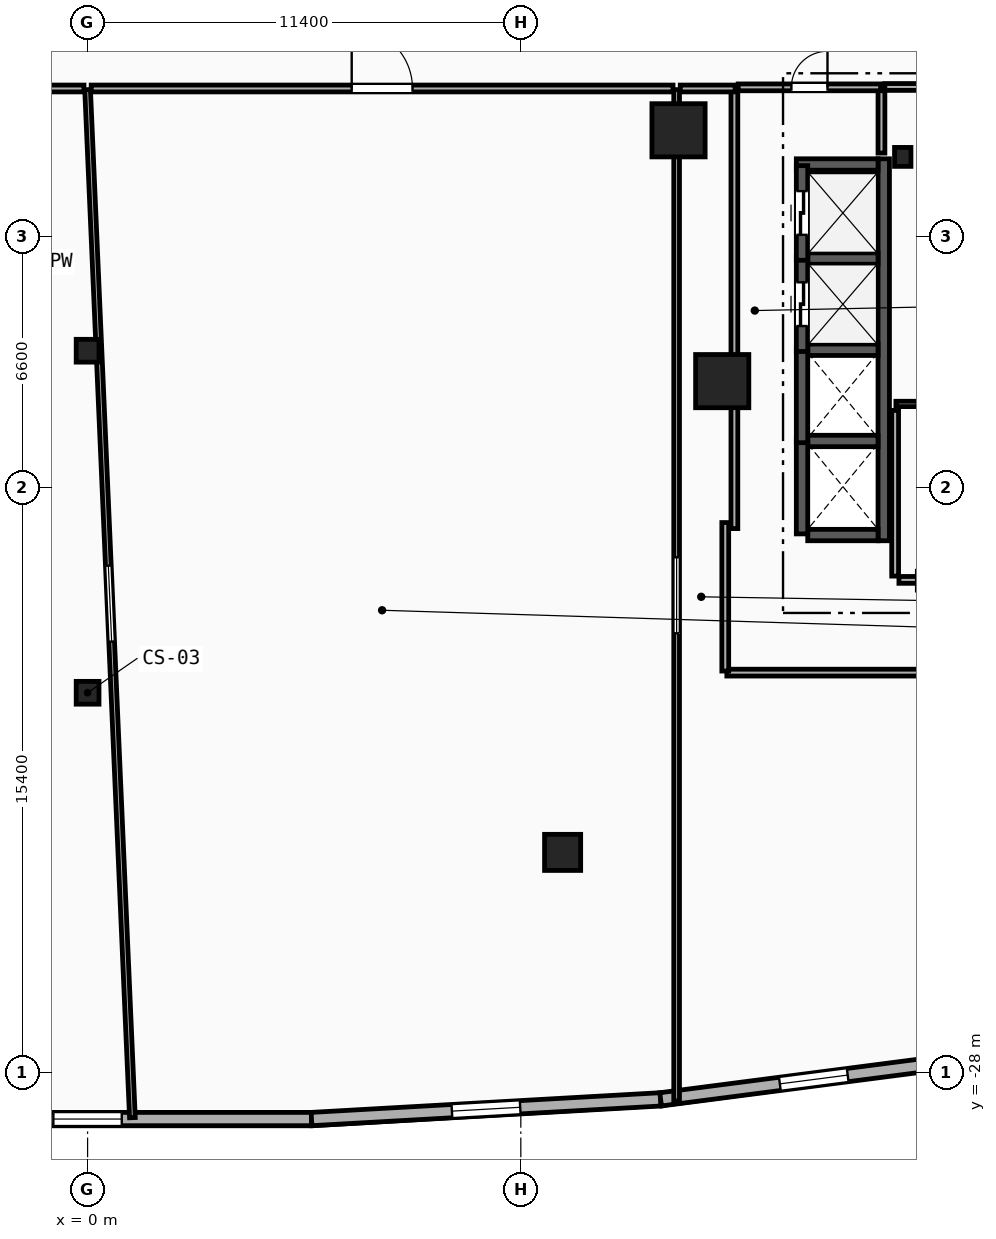
"""IFC4 building model, lengths in metres.
Left out: names, types, materials, properties, quantities, classifications, styles, units other than length and angle.
Written with IfcOpenShell. Run it as: python <this file> out.ifc"""

import sys

from ifc_helpers import new_model, si_unit, direction, frame, frame_2d, origin, origin_2d, place, context, subcontext, project, spatial, rectangle, hollow_rectangle, circle, i_section, extrude, element, fill, save


model = new_model("IFC4")
c1 = context("Model", 3, precision=1e-05, world=origin(), true_north=direction((0.0, 1.0)))
c2 = subcontext(c1, "Body", "Model", "MODEL_VIEW")
j1 = project(units=[si_unit("LENGTHUNIT", "METRE"), si_unit("PLANEANGLEUNIT", "RADIAN")], contexts=[c1])
p1 = place(None, origin())
s1 = spatial("IfcSite", under=j1, at=p1, CompositionType="ELEMENT")
p2 = place(p1, origin())
s2 = spatial("IfcBuilding", under=s1, at=p2, CompositionType="ELEMENT")
p3 = place(p2, frame((0.0, 0.0, 16.0)))
s3 = spatial("IfcBuildingStorey", under=s2, at=p3, CompositionType="ELEMENT", Elevation=16.0)
p4 = place(p3, frame((21.45, -3.9, 0.0), z_axis=(0.0, 0.0, 1.0), x_axis=(1.0, 0.0, 0.0)))
e1 = element("IfcColumn", 1, at=p4, inside=s3, PredefinedType="COLUMN", context=c2, shape_type="SweptSolid", body=[
    extrude(i_section(OverallWidth=0.432, OverallDepth=0.498, WebThickness=0.056, FlangeThickness=0.089, FilletRadius=0.018, at=origin_2d()), origin(), (0.0, 0.0, 1.0), 4.0),
])
for number, where, z_axis, x_axis in (
    (2, (15.55, -3.2, 0.0), (0.0, 0.0, 1.0), (1.0, 0.0, 0.0)),
    (3, (16.7, -9.8, 0.0), (0.0, 0.0, 1.0), (1.0, 0.0, 0.0)),
):
    element("IfcColumn", number, at=place(p3, frame(where, z_axis=z_axis, x_axis=x_axis)), inside=s3, PredefinedType="COLUMN", context=c2, shape_type="SweptSolid", body=[
        extrude(rectangle(XDim=1.4, YDim=1.4, at=origin_2d()), origin(), (0.0, 0.0, 1.0), 4.0),
    ])
for number, where, z_axis, x_axis in (
    (4, (0.0, -18.0, 0.0), (0.0, 0.0, 1.0), (1.0, 0.0, 0.0)),
    (5, (0.0, -9.0, 0.0), (0.0, 0.0, 1.0), (1.0, 0.0, 0.0)),
):
    element("IfcColumn", number, at=place(p3, frame(where, z_axis=z_axis, x_axis=x_axis)), inside=s3, PredefinedType="COLUMN", context=c2, shape_type="SweptSolid", body=[
        extrude(hollow_rectangle(XDim=0.6, YDim=0.6, WallThickness=0.032, at=origin_2d()), origin(), (0.0, 0.0, 1.0), 4.0),
    ])
p5 = place(p3, frame((12.5, -22.2, 0.0), z_axis=(0.0, 0.0, 1.0), x_axis=(1.0, 0.0, 0.0)))
e6 = element("IfcColumn", 6, at=p5, inside=s3, PredefinedType="PILASTER", context=c2, shape_type="SweptSolid", body=[
    extrude(circle(Radius=0.475, at=origin_2d()), origin(), (0.0, 0.0, 1.0), 4.0),
])
p6 = place(p3, frame((-5.893, -29.216, 0.0), z_axis=(0.0, 0.0, 1.0), x_axis=(1.0, 0.0, 0.0)))
e7 = element("IfcWall", 7, at=p6, inside=s3, PredefinedType="SOLIDWALL", context=c2, shape_type="SweptSolid", body=[
    extrude(rectangle(XDim=11.785, YDim=0.35, at=frame_2d((5.893, 0.0))), origin(), (0.0, 0.0, 1.0), 3.65),
])
p7 = place(p6, frame((4.992, 0.0, 0.85)))
e8 = element("IfcOpeningElement", 8, at=p7, cuts=e7, PredefinedType="OPENING", context=c2, shape_type="SweptSolid", body=[
    extrude(rectangle(XDim=1.8, YDim=2.4, at=frame_2d((0.9, 1.2))), frame((0.0, 0.185, 0.0), z_axis=(0.0, -1.0, 0.0), x_axis=(1.0, 0.0, 0.0)), (0.0, 0.0, 1.0), 0.37),
])
p8 = place(p3, frame((5.893, -29.216, 0.0), z_axis=(0.0, 0.0, 1.0), x_axis=(0.998413463137, 0.056307695976, 0.0)))
e9 = element("IfcWall", 9, at=p8, inside=s3, PredefinedType="SOLIDWALL", context=c2, shape_type="SweptSolid", body=[
    extrude(rectangle(XDim=9.201, YDim=0.35, at=frame_2d((4.6, 0.0))), origin(), (0.0, 0.0, 1.0), 3.65),
])
p9 = place(p8, frame((3.7, 0.0, 0.85)))
e10 = element("IfcOpeningElement", 10, at=p9, cuts=e9, PredefinedType="OPENING", context=c2, shape_type="SweptSolid", body=[
    extrude(rectangle(XDim=1.8, YDim=2.4, at=frame_2d((0.9, 1.2))), frame((0.0, 0.185, 0.0), z_axis=(0.0, -1.0, 0.0), x_axis=(1.0, 0.0, 0.0)), (0.0, 0.0, 1.0), 0.37),
])
p10 = place(p3, frame((15.079, -28.698, 0.0), z_axis=(0.0, 0.0, 1.0), x_axis=(0.991688106477, 0.128665067026, 0.0)))
e11 = element("IfcWall", 11, at=p10, inside=s3, PredefinedType="SOLIDWALL", context=c2, shape_type="SweptSolid", body=[
    extrude(rectangle(XDim=8.129, YDim=0.35, at=frame_2d((4.064, 0.0))), origin(), (0.0, 0.0, 1.0), 3.65),
])
p11 = place(p10, frame((3.164, 0.0, 0.85)))
e12 = element("IfcOpeningElement", 12, at=p11, cuts=e11, PredefinedType="OPENING", context=c2, shape_type="SweptSolid", body=[
    extrude(rectangle(XDim=1.8, YDim=2.4, at=frame_2d((0.9, 1.2))), frame((0.0, 0.185, 0.0), z_axis=(0.0, -1.0, 0.0), x_axis=(1.0, 0.0, 0.0)), (0.0, 0.0, 1.0), 0.37),
])
p12 = place(p3, frame((20.89, -3.8, 0.0), z_axis=(0.0, 0.0, 1.0), x_axis=(0.0, 1.0, 0.0)))
e13 = element("IfcWall", 13, at=p12, inside=s3, PredefinedType="PARTITIONING", context=c2, shape_type="SweptSolid", body=[
    extrude(rectangle(XDim=1.65, YDim=0.18, at=frame_2d((0.825, 0.0))), origin(), (0.0, 0.0, 1.0), 3.65),
])
p13 = place(p3, frame((20.98, -2.06, 0.0), z_axis=(0.0, 0.0, 1.0), x_axis=(1.0, 0.0, 0.0)))
e14 = element("IfcWall", 14, at=p13, inside=s3, PredefinedType="PARTITIONING", context=c2, shape_type="SweptSolid", body=[
    extrude(rectangle(XDim=3.0, YDim=0.18, at=frame_2d((1.5, 0.0))), origin(), (0.0, 0.0, 1.0), 3.65),
])
p14 = place(p13, frame((0.9, 0.0, 0.0)))
e15 = element("IfcOpeningElement", 15, at=p14, cuts=e14, PredefinedType="OPENING", context=c2, shape_type="SweptSolid", body=[
    extrude(rectangle(XDim=1.2, YDim=2.15, at=frame_2d((0.6, 1.075))), frame((0.0, 0.1, 0.0), z_axis=(0.0, -1.0, 0.0), x_axis=(1.0, 0.0, 0.0)), (0.0, 0.0, 1.0), 0.2),
])
p15 = place(p3, frame((20.95, -14.0, 0.0), z_axis=(0.0, 0.0, 1.0), x_axis=(0.0, 1.0, 0.0)))
e16 = element("IfcWall", 16, at=p15, inside=s3, PredefinedType="SHEAR", context=c2, shape_type="SweptSolid", body=[
    extrude(rectangle(XDim=10.05, YDim=0.3, at=frame_2d((5.025, 0.0))), origin(), (0.0, 0.0, 1.0), 3.65),
])
p16 = place(p3, frame((18.95, -13.85, 0.0), z_axis=(0.0, 0.0, 1.0), x_axis=(1.0, 0.0, 0.0)))
e17 = element("IfcWall", 17, at=p16, inside=s3, PredefinedType="SHEAR", context=c2, shape_type="SweptSolid", body=[
    extrude(rectangle(XDim=1.85, YDim=0.3, at=frame_2d((0.925, 0.0))), origin(), (0.0, 0.0, 1.0), 3.65),
])
p17 = place(p3, frame((18.65, -4.1, 0.0), z_axis=(0.0, 0.0, 1.0), x_axis=(1.0, 0.0, 0.0)))
e18 = element("IfcWall", 18, at=p17, inside=s3, PredefinedType="SHEAR", context=c2, shape_type="SweptSolid", body=[
    extrude(rectangle(XDim=2.15, YDim=0.3, at=frame_2d((1.075, 0.0))), origin(), (0.0, 0.0, 1.0), 3.65),
])
for number, where, z_axis, x_axis in (
    (19, (18.95, -11.375, 0.0), (0.0, 0.0, 1.0), (1.0, 0.0, 0.0)),
    (20, (18.95, -8.975, 0.0), (0.0, 0.0, 1.0), (1.0, 0.0, 0.0)),
    (21, (18.95, -6.575, 0.0), (0.0, 0.0, 1.0), (1.0, 0.0, 0.0)),
):
    element("IfcWall", number, at=place(p3, frame(where, z_axis=z_axis, x_axis=x_axis)), inside=s3, PredefinedType="SHEAR", context=c2, shape_type="SweptSolid", body=[
        extrude(rectangle(XDim=1.85, YDim=0.3, at=frame_2d((0.925, 0.0))), origin(), (0.0, 0.0, 1.0), 3.65),
    ])
for number, where, z_axis, x_axis in (
    (22, (18.8, -13.82, 0.0), (0.0, 0.0, 1.0), (0.0, 1.0, 0.0)),
    (23, (18.8, -11.42, 0.0), (0.0, 0.0, 1.0), (0.0, 1.0, 0.0)),
):
    element("IfcWall", number, at=place(p3, frame(where, z_axis=z_axis, x_axis=x_axis)), inside=s3, PredefinedType="SHEAR", context=c2, shape_type="SweptSolid", body=[
        extrude(rectangle(XDim=2.49, YDim=0.3, at=frame_2d((1.245, 0.0))), origin(), (0.0, 0.0, 1.0), 3.65),
    ])
p18 = place(p3, frame((18.8, -9.02, 0.0), z_axis=(0.0, 0.0, 1.0), x_axis=(0.0, 1.0, 0.0)))
e24 = element("IfcWall", 24, at=p18, inside=s3, PredefinedType="SHEAR", context=c2, shape_type="SweptSolid", body=[
    extrude(rectangle(XDim=2.49, YDim=0.3, at=frame_2d((1.245, 0.0))), origin(), (0.0, 0.0, 1.0), 3.65),
])
p19 = place(p18, frame((0.67, 0.0, 0.0)))
e25 = element("IfcOpeningElement", 25, at=p19, cuts=e24, PredefinedType="OPENING", context=c2, shape_type="SweptSolid", body=[
    extrude(rectangle(XDim=1.15, YDim=2.2, at=frame_2d((0.575, 1.1))), frame((0.0, 0.16, 0.0), z_axis=(0.0, -1.0, 0.0), x_axis=(1.0, 0.0, 0.0)), (0.0, 0.0, 1.0), 0.32),
])
p20 = place(p3, frame((18.8, -6.62, 0.0), z_axis=(0.0, 0.0, 1.0), x_axis=(0.0, 1.0, 0.0)))
e26 = element("IfcWall", 26, at=p20, inside=s3, PredefinedType="SHEAR", context=c2, shape_type="SweptSolid", body=[
    extrude(rectangle(XDim=2.49, YDim=0.3, at=frame_2d((1.245, 0.0))), origin(), (0.0, 0.0, 1.0), 3.65),
])
p21 = place(p20, frame((0.67, 0.0, 0.0)))
e27 = element("IfcOpeningElement", 27, at=p21, cuts=e26, PredefinedType="OPENING", context=c2, shape_type="SweptSolid", body=[
    extrude(rectangle(XDim=1.15, YDim=2.2, at=frame_2d((0.575, 1.1))), frame((0.0, 0.16, 0.0), z_axis=(0.0, -1.0, 0.0), x_axis=(1.0, 0.0, 0.0)), (0.0, 0.0, 1.0), 0.32),
])
p22 = place(p3, frame((17.02, -13.68, 0.0), z_axis=(0.0, 0.0, 1.0), x_axis=(0.0, 1.0, 0.0)))
e28 = element("IfcWall", 28, at=p22, inside=s3, PredefinedType="PARTITIONING", context=c2, shape_type="SweptSolid", body=[
    extrude(rectangle(XDim=11.51, YDim=0.18, at=frame_2d((5.755, 0.0))), origin(), (0.0, 0.0, 1.0), 3.65),
])
p23 = place(p3, frame((17.12, -2.07, 0.0), z_axis=(0.0, 0.0, 1.0), x_axis=(1.0, 0.0, 0.0)))
e29 = element("IfcWall", 29, at=p23, inside=s3, PredefinedType="PARTITIONING", context=c2, shape_type="SweptSolid", body=[
    extrude(rectangle(XDim=3.75, YDim=0.18, at=frame_2d((1.875, 0.0))), origin(), (0.0, 0.0, 1.0), 3.65),
])
p24 = place(p23, frame((1.4, 0.0, 0.0)))
e30 = element("IfcOpeningElement", 30, at=p24, cuts=e29, PredefinedType="OPENING", context=c2, shape_type="SweptSolid", body=[
    extrude(rectangle(XDim=0.95, YDim=2.1, at=frame_2d((0.475, 1.05))), frame((0.0, 0.1, 0.0), z_axis=(0.0, -1.0, 0.0), x_axis=(1.0, 0.0, 0.0)), (0.0, 0.0, 1.0), 0.2),
])
p25 = place(p3, frame((21.27, -10.4, 0.0), z_axis=(0.0, 0.0, 1.0), x_axis=(1.0, 0.0, 0.0)))
e31 = element("IfcWall", 31, at=p25, inside=s3, PredefinedType="PARTITIONING", context=c2, shape_type="SweptSolid", body=[
    extrude(rectangle(XDim=0.59, YDim=0.14, at=frame_2d((0.295, 0.0))), origin(), (0.0, 0.0, 1.0), 3.65),
])
p26 = place(p3, frame((21.25, -14.93, 0.0), z_axis=(0.0, 0.0, 1.0), x_axis=(0.0, 1.0, 0.0)))
e32 = element("IfcWall", 32, at=p26, inside=s3, PredefinedType="PARTITIONING", context=c2, shape_type="SweptSolid", body=[
    extrude(rectangle(XDim=4.36, YDim=0.18, at=frame_2d((2.18, 0.0))), origin(), (0.0, 0.0, 1.0), 3.65),
])
p27 = place(p3, frame((21.35, -15.03, 0.0), z_axis=(0.0, 0.0, 1.0), x_axis=(1.0, 0.0, 0.0)))
e33 = element("IfcWall", 33, at=p27, inside=s3, PredefinedType="PARTITIONING", context=c2, shape_type="SweptSolid", body=[
    extrude(rectangle(XDim=2.61, YDim=0.18, at=frame_2d((1.305, 0.0))), origin(), (0.0, 0.0, 1.0), 2.723),
])
p28 = place(p3, frame((1.179, -29.18, 0.0), z_axis=(0.0, 0.0, 1.0), x_axis=(-0.043560875221, 0.999050774561, 0.0)))
e34 = element("IfcWall", 34, at=p28, inside=s3, PredefinedType="PARTITIONING", context=c2, shape_type="SweptSolid", body=[
    extrude(rectangle(XDim=27.076, YDim=0.15, at=frame_2d((13.538, 0.0))), origin(), (0.0, 0.0, 1.0), 2.877),
])
p29 = place(p28, frame((12.538, 0.0, 1.05)))
e35 = element("IfcOpeningElement", 35, at=p29, cuts=e34, PredefinedType="OPENING", context=c2, shape_type="SweptSolid", body=[
    extrude(rectangle(XDim=2.0, YDim=1.5, at=frame_2d((1.0, 0.75))), frame((0.0, 0.085, 0.0), z_axis=(0.0, -1.0, 0.0), x_axis=(1.0, 0.0, 0.0)), (0.0, 0.0, 1.0), 0.17),
])
p30 = place(p3, frame((15.5, -28.74, 0.0), z_axis=(0.0, 0.0, 1.0), x_axis=(0.0, 1.0, 0.0)))
e36 = element("IfcWall", 36, at=p30, inside=s3, PredefinedType="PARTITIONING", context=c2, shape_type="SweptSolid", body=[
    extrude(rectangle(XDim=26.61, YDim=0.15, at=frame_2d((13.305, 0.0))), origin(), (0.0, 0.0, 1.0), 2.877),
])
p31 = place(p30, frame((12.305, 0.0, 1.05)))
e37 = element("IfcOpeningElement", 37, at=p31, cuts=e36, PredefinedType="OPENING", context=c2, shape_type="SweptSolid", body=[
    extrude(rectangle(XDim=2.0, YDim=1.5, at=frame_2d((1.0, 0.75))), frame((0.0, 0.085, 0.0), z_axis=(0.0, -1.0, 0.0), x_axis=(1.0, 0.0, 0.0)), (0.0, 0.0, 1.0), 0.17),
])
p32 = place(p3, frame((16.822, -17.47, 0.0), z_axis=(0.0, 0.0, 1.0), x_axis=(1.0, 0.0, 0.0)))
e38 = element("IfcWall", 38, at=p32, inside=s3, PredefinedType="PARTITIONING", context=c2, shape_type="SweptSolid", body=[
    extrude(rectangle(XDim=14.083, YDim=0.18, at=frame_2d((7.042, 0.0))), origin(), (0.0, 0.0, 1.0), 3.65),
])
p33 = place(p32, frame((6.242, 0.0, 0.0)))
e39 = element("IfcOpeningElement", 39, at=p33, cuts=e38, PredefinedType="OPENING", context=c2, shape_type="SweptSolid", body=[
    extrude(rectangle(XDim=1.6, YDim=2.2, at=frame_2d((0.8, 1.1))), frame((0.0, 0.1, 0.0), z_axis=(0.0, -1.0, 0.0), x_axis=(1.0, 0.0, 0.0)), (0.0, 0.0, 1.0), 0.2),
])
p34 = place(p3, frame((16.78, -13.521, 0.0), z_axis=(0.0, 0.0, 1.0), x_axis=(0.0, -1.0, 0.0)))
e40 = element("IfcWall", 40, at=p34, inside=s3, PredefinedType="PARTITIONING", context=c2, shape_type="SweptSolid", body=[
    extrude(rectangle(XDim=3.907, YDim=0.18, at=frame_2d((1.954, 0.0))), origin(), (0.0, 0.0, 1.0), 3.65),
])
p35 = place(p3, frame((15.595, -2.1, 0.0), z_axis=(0.0, 0.0, 1.0), x_axis=(1.0, 0.0, 0.0)))
e41 = element("IfcWall", 41, at=p35, inside=s3, PredefinedType="PARTITIONING", context=c2, shape_type="SweptSolid", body=[
    extrude(rectangle(XDim=1.445, YDim=0.18, at=frame_2d((0.723, 0.0))), origin(), (0.0, 0.0, 1.0), 3.65),
])
p36 = place(p3, frame((-8.1, -2.1, 0.0), z_axis=(0.0, 0.0, 1.0), x_axis=(1.0, 0.0, 0.0)))
e42 = element("IfcWall", 42, at=p36, inside=s3, PredefinedType="PARTITIONING", context=c2, shape_type="SweptSolid", body=[
    extrude(rectangle(XDim=8.005, YDim=0.18, at=frame_2d((4.002, 0.0))), origin(), (0.0, 0.0, 1.0), 3.65),
])
p37 = place(p36, frame((3.302, 0.0, 1.05)))
e43 = element("IfcOpeningElement", 43, at=p37, cuts=e42, PredefinedType="OPENING", context=c2, shape_type="SweptSolid", body=[
    extrude(rectangle(XDim=1.4, YDim=1.5, at=frame_2d((0.7, 0.75))), frame((0.0, 0.1, 0.0), z_axis=(0.0, -1.0, 0.0), x_axis=(1.0, 0.0, 0.0)), (0.0, 0.0, 1.0), 0.2),
])
p38 = place(p3, frame((0.095, -2.1, 0.0), z_axis=(0.0, 0.0, 1.0), x_axis=(1.0, 0.0, 0.0)))
e44 = element("IfcWall", 44, at=p38, inside=s3, PredefinedType="PARTITIONING", context=c2, shape_type="SweptSolid", body=[
    extrude(rectangle(XDim=15.31, YDim=0.18, at=frame_2d((7.655, 0.0))), origin(), (0.0, 0.0, 1.0), 2.877),
])
p39 = place(p38, frame((6.855, 0.0, 0.0)))
e45 = element("IfcOpeningElement", 45, at=p39, cuts=e44, PredefinedType="OPENING", context=c2, shape_type="SweptSolid", body=[
    extrude(rectangle(XDim=1.6, YDim=2.2, at=frame_2d((0.8, 1.1))), frame((0.0, 0.1, 0.0), z_axis=(0.0, -1.0, 0.0), x_axis=(1.0, 0.0, 0.0)), (0.0, 0.0, 1.0), 0.2),
])
p40 = place(p7, origin())
e46 = element("IfcWindow", 46, at=p40, inside=s3, PartitioningType="SINGLE_PANEL", PredefinedType="WINDOW", context=c2, shape_type="SweptSolid", body=[
    extrude(rectangle(XDim=1.8, YDim=2.4, at=frame_2d((0.9, 1.2))), frame((0.0, 0.03, 0.0), z_axis=(0.0, -1.0, 0.0), x_axis=(1.0, 0.0, 0.0)), (0.0, 0.0, 1.0), 0.06),
])
fill(e8, e46)
p41 = place(p9, origin())
e47 = element("IfcWindow", 47, at=p41, inside=s3, PartitioningType="SINGLE_PANEL", PredefinedType="WINDOW", context=c2, shape_type="SweptSolid", body=[
    extrude(rectangle(XDim=1.8, YDim=2.4, at=frame_2d((0.9, 1.2))), frame((0.0, 0.03, 0.0), z_axis=(0.0, -1.0, 0.0), x_axis=(1.0, 0.0, 0.0)), (0.0, 0.0, 1.0), 0.06),
])
fill(e10, e47)
p42 = place(p11, origin())
e48 = element("IfcWindow", 48, at=p42, inside=s3, PartitioningType="SINGLE_PANEL", PredefinedType="WINDOW", context=c2, shape_type="SweptSolid", body=[
    extrude(rectangle(XDim=1.8, YDim=2.4, at=frame_2d((0.9, 1.2))), frame((0.0, 0.03, 0.0), z_axis=(0.0, -1.0, 0.0), x_axis=(1.0, 0.0, 0.0)), (0.0, 0.0, 1.0), 0.06),
])
fill(e12, e48)
p43 = place(p19, origin())
e49 = element("IfcDoor", 49, at=p43, inside=s3, OperationType="SLIDING_TO_LEFT", PredefinedType="TRAPDOOR", context=c2, shape_type="SweptSolid", body=[
    extrude(rectangle(XDim=1.15, YDim=2.2, at=frame_2d((0.575, 1.1))), frame((0.0, 0.025, 0.0), z_axis=(0.0, -1.0, 0.0), x_axis=(1.0, 0.0, 0.0)), (0.0, 0.0, 1.0), 0.05),
])
fill(e25, e49)
p44 = place(p21, origin())
e50 = element("IfcDoor", 50, at=p44, inside=s3, OperationType="SLIDING_TO_LEFT", PredefinedType="TRAPDOOR", context=c2, shape_type="SweptSolid", body=[
    extrude(rectangle(XDim=1.15, YDim=2.2, at=frame_2d((0.575, 1.1))), frame((0.0, 0.025, 0.0), z_axis=(0.0, -1.0, 0.0), x_axis=(1.0, 0.0, 0.0)), (0.0, 0.0, 1.0), 0.05),
])
fill(e27, e50)
p45 = place(p39, origin())
e51 = element("IfcDoor", 51, at=p45, inside=s3, OperationType="SINGLE_SWING_LEFT", PredefinedType="DOOR", context=c2, shape_type="SweptSolid", body=[
    extrude(rectangle(XDim=1.6, YDim=2.2, at=frame_2d((0.8, 1.1))), frame((0.0, 0.025, 0.0), z_axis=(0.0, -1.0, 0.0), x_axis=(1.0, 0.0, 0.0)), (0.0, 0.0, 1.0), 0.05),
])
fill(e45, e51)
p46 = place(p24, origin())
e52 = element("IfcDoor", 52, at=p46, inside=s3, OperationType="SINGLE_SWING_RIGHT", PredefinedType="DOOR", context=c2, shape_type="SweptSolid", body=[
    extrude(rectangle(XDim=0.95, YDim=2.1, at=frame_2d((0.475, 1.05))), frame((0.0, 0.025, 0.0), z_axis=(0.0, -1.0, 0.0), x_axis=(1.0, 0.0, 0.0)), (0.0, 0.0, 1.0), 0.05),
])
fill(e30, e52)
p47 = place(p29, origin())
e53 = element("IfcWindow", 53, at=p47, inside=s3, PartitioningType="SINGLE_PANEL", PredefinedType="WINDOW", context=c2, shape_type="SweptSolid", body=[
    extrude(rectangle(XDim=2.0, YDim=1.5, at=frame_2d((1.0, 0.75))), frame((0.0, 0.03, 0.0), z_axis=(0.0, -1.0, 0.0), x_axis=(1.0, 0.0, 0.0)), (0.0, 0.0, 1.0), 0.06),
])
fill(e35, e53)
p48 = place(p31, origin())
e54 = element("IfcWindow", 54, at=p48, inside=s3, PartitioningType="SINGLE_PANEL", PredefinedType="WINDOW", context=c2, shape_type="SweptSolid", body=[
    extrude(rectangle(XDim=2.0, YDim=1.5, at=frame_2d((1.0, 0.75))), frame((0.0, 0.03, 0.0), z_axis=(0.0, -1.0, 0.0), x_axis=(1.0, 0.0, 0.0)), (0.0, 0.0, 1.0), 0.06),
])
fill(e37, e54)
save(model, sys.argv[1])
